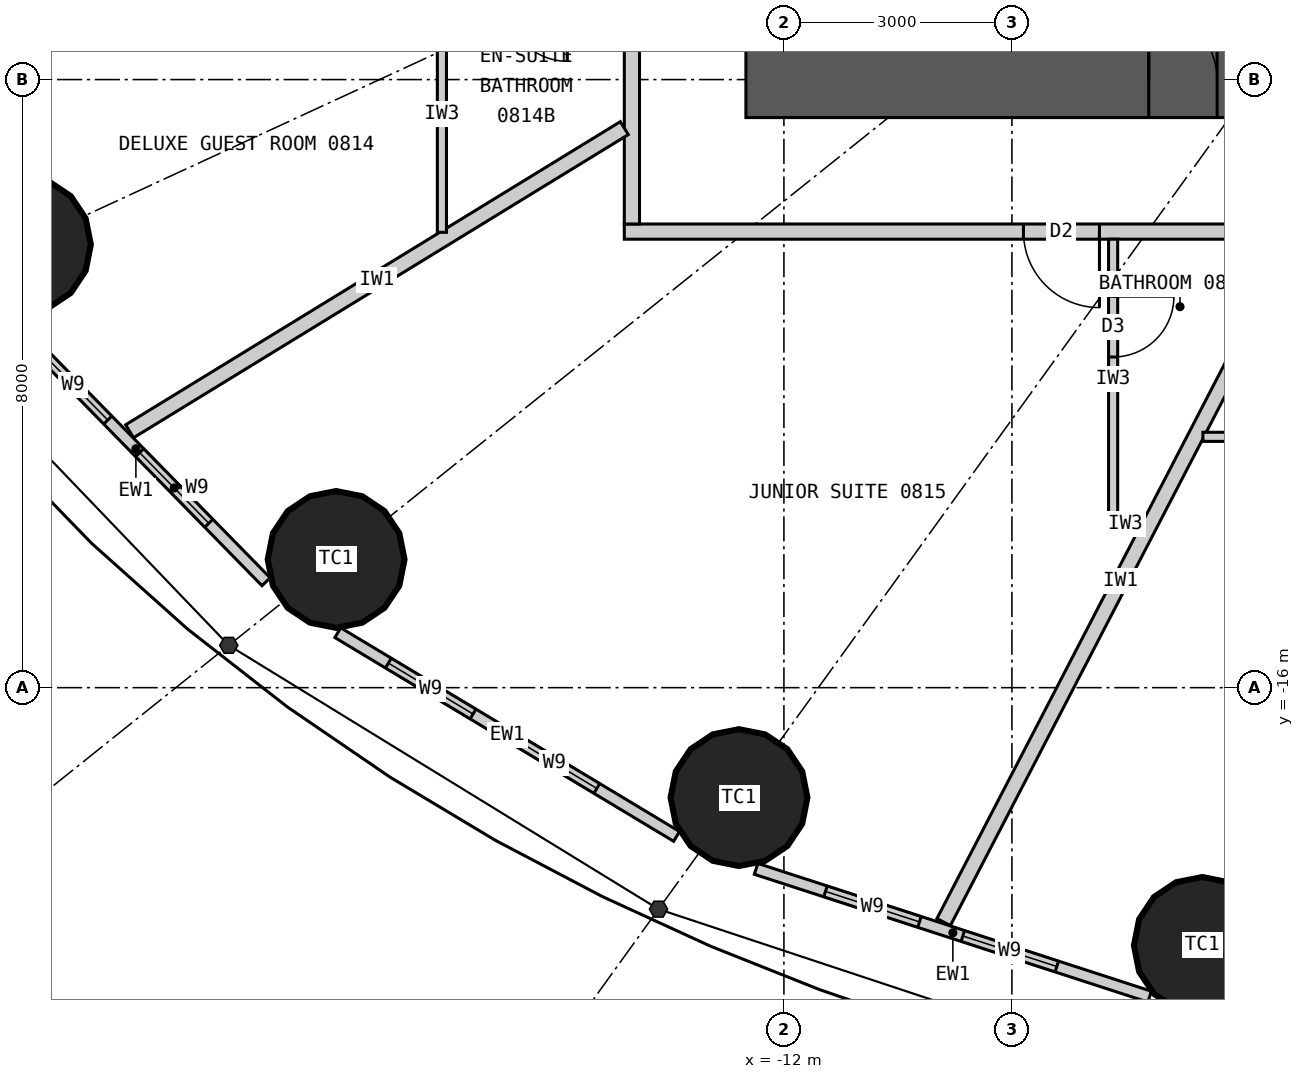
"""IFC4 building model, lengths in metres.
Left out: names, types, materials, properties, quantities, classifications, styles, units other than length and angle.
Written with IfcOpenShell. Run it as: python <this file> out.ifc"""

import sys

from ifc_helpers import new_model, si_unit, direction, frame, frame_2d, origin, origin_2d, place, context, subcontext, project, spatial, rectangle, circle, extrude, element, fill, save


model = new_model("IFC4")
c1 = context("Model", 3, precision=1e-05, world=origin(), true_north=direction((0.0, 1.0)))
c2 = subcontext(c1, "Body", "Model", "MODEL_VIEW")
j1 = project(units=[si_unit("LENGTHUNIT", "METRE"), si_unit("PLANEANGLEUNIT", "RADIAN")], contexts=[c1])
p1 = place(None, origin())
s1 = spatial("IfcSite", under=j1, at=p1, CompositionType="ELEMENT")
p2 = place(p1, origin())
s2 = spatial("IfcBuilding", under=s1, at=p2, CompositionType="ELEMENT")
p3 = place(p2, frame((0.0, 0.0, 39.3)))
s3 = spatial("IfcBuildingStorey", under=s2, at=p3, CompositionType="ELEMENT", Elevation=39.3)
for number, where, z_axis, x_axis in (
    (1, (-22.019, -10.17, 0.0), (0.0, 0.0, 1.0), (1.0, 0.0, 0.0)),
    (2, (-17.892, -14.313, 0.0), (0.0, 0.0, 1.0), (1.0, 0.0, 0.0)),
    (3, (-12.591, -17.447, 0.0), (0.0, 0.0, 1.0), (1.0, 0.0, 0.0)),
    (4, (-6.495, -19.391, 0.0), (0.0, 0.0, 1.0), (1.0, 0.0, 0.0)),
):
    element("IfcColumn", number, at=place(p3, frame(where, z_axis=z_axis, x_axis=x_axis)), inside=s3, PredefinedType="COLUMN", context=c2, shape_type="SweptSolid", body=[
        extrude(circle(Radius=0.9, at=origin_2d()), origin(), (0.0, 0.0, 1.0), 3.3),
    ])
p4 = place(p3, frame((12.5, -8.0, 0.0), z_axis=(0.0, 0.0, 1.0), x_axis=(-1.0, 0.0, 0.0)))
e5 = element("IfcWall", 5, at=p4, inside=s3, PredefinedType="SHEAR", context=c2, shape_type="SweptSolid", body=[
    extrude(rectangle(XDim=25.0, YDim=1.0, at=frame_2d((12.5, 0.0))), origin(), (0.0, 0.0, 1.0), 3.3),
])
p5 = place(p4, frame((11.2, 0.0, 0.0)))
e6 = element("IfcOpeningElement", 6, at=p5, cuts=e5, PredefinedType="OPENING", context=c2, shape_type="SweptSolid", body=[
    extrude(rectangle(XDim=1.2, YDim=2.2, at=frame_2d((0.6, 1.1))), frame((0.0, 0.51, 0.0), z_axis=(0.0, -1.0, 0.0), x_axis=(1.0, 0.0, 0.0)), (0.0, 0.0, 1.0), 1.02),
])
p6 = place(p4, frame((18.8, 0.0, 0.0)))
e7 = element("IfcOpeningElement", 7, at=p6, cuts=e5, PredefinedType="OPENING", context=c2, shape_type="SweptSolid", body=[
    extrude(rectangle(XDim=0.9, YDim=2.2, at=frame_2d((0.45, 1.1))), frame((0.0, 0.51, 0.0), z_axis=(0.0, -1.0, 0.0), x_axis=(1.0, 0.0, 0.0)), (0.0, 0.0, 1.0), 1.02),
])
p7 = place(p3, frame((-22.239, -11.108, 0.0), z_axis=(0.0, 0.0, 1.0), x_axis=(0.699612594083, -0.714522370679, 0.0)))
e8 = element("IfcWall", 8, at=p7, inside=s3, PredefinedType="ELEMENTEDWALL", context=c2, shape_type="SweptSolid", body=[
    extrude(rectangle(XDim=4.896, YDim=0.15, at=frame_2d((2.448, 0.0))), origin(), (0.0, 0.0, 1.0), 3.12),
])
p8 = place(p7, frame((0.619, 0.0, 0.9)))
e9 = element("IfcOpeningElement", 9, at=p8, cuts=e8, PredefinedType="OPENING", context=c2, shape_type="SweptSolid", body=[
    extrude(rectangle(XDim=1.3, YDim=1.9, at=frame_2d((0.65, 0.95))), frame((0.0, 0.085, 0.0), z_axis=(0.0, -1.0, 0.0), x_axis=(1.0, 0.0, 0.0)), (0.0, 0.0, 1.0), 0.17),
])
p9 = place(p7, frame((2.519, 0.0, 0.9)))
e10 = element("IfcOpeningElement", 10, at=p9, cuts=e8, PredefinedType="OPENING", context=c2, shape_type="SweptSolid", body=[
    extrude(rectangle(XDim=1.3, YDim=1.9, at=frame_2d((0.65, 0.95))), frame((0.0, 0.085, 0.0), z_axis=(0.0, -1.0, 0.0), x_axis=(1.0, 0.0, 0.0)), (0.0, 0.0, 1.0), 0.17),
])
p10 = place(p3, frame((-17.869, -15.277, 0.0), z_axis=(0.0, 0.0, 1.0), x_axis=(0.856958191554, -0.515385931054, 0.0)))
e11 = element("IfcWall", 11, at=p10, inside=s3, PredefinedType="ELEMENTEDWALL", context=c2, shape_type="SweptSolid", body=[
    extrude(rectangle(XDim=5.201, YDim=0.15, at=frame_2d((2.601, 0.0))), origin(), (0.0, 0.0, 1.0), 3.12),
])
p11 = place(p10, frame((0.776, 0.0, 0.9)))
e12 = element("IfcOpeningElement", 12, at=p11, cuts=e11, PredefinedType="OPENING", context=c2, shape_type="SweptSolid", body=[
    extrude(rectangle(XDim=1.3, YDim=1.9, at=frame_2d((0.65, 0.95))), frame((0.0, 0.085, 0.0), z_axis=(0.0, -1.0, 0.0), x_axis=(1.0, 0.0, 0.0)), (0.0, 0.0, 1.0), 0.17),
])
p12 = place(p10, frame((2.676, 0.0, 0.9)))
e13 = element("IfcOpeningElement", 13, at=p12, cuts=e11, PredefinedType="OPENING", context=c2, shape_type="SweptSolid", body=[
    extrude(rectangle(XDim=1.3, YDim=1.9, at=frame_2d((0.65, 0.95))), frame((0.0, 0.085, 0.0), z_axis=(0.0, -1.0, 0.0), x_axis=(1.0, 0.0, 0.0)), (0.0, 0.0, 1.0), 0.17),
])
p13 = place(p3, frame((-12.366, -18.384, 0.0), z_axis=(0.0, 0.0, 1.0), x_axis=(0.951138486029, -0.308764603532, 0.0)))
e14 = element("IfcWall", 14, at=p13, inside=s3, PredefinedType="ELEMENTEDWALL", context=c2, shape_type="SweptSolid", body=[
    extrude(rectangle(XDim=5.444, YDim=0.15, at=frame_2d((2.722, 0.0))), origin(), (0.0, 0.0, 1.0), 3.12),
])
p14 = place(p13, frame((0.96, 0.0, 0.9)))
e15 = element("IfcOpeningElement", 15, at=p14, cuts=e14, PredefinedType="OPENING", context=c2, shape_type="SweptSolid", body=[
    extrude(rectangle(XDim=1.3, YDim=1.9, at=frame_2d((0.65, 0.95))), frame((0.0, 0.085, 0.0), z_axis=(0.0, -1.0, 0.0), x_axis=(1.0, 0.0, 0.0)), (0.0, 0.0, 1.0), 0.17),
])
p15 = place(p13, frame((2.86, 0.0, 0.9)))
e16 = element("IfcOpeningElement", 16, at=p15, cuts=e14, PredefinedType="OPENING", context=c2, shape_type="SweptSolid", body=[
    extrude(rectangle(XDim=1.3, YDim=1.9, at=frame_2d((0.65, 0.95))), frame((0.0, 0.085, 0.0), z_axis=(0.0, -1.0, 0.0), x_axis=(1.0, 0.0, 0.0)), (0.0, 0.0, 1.0), 0.17),
])
p16 = place(p3, frame((14.1, -10.0, 0.0), z_axis=(0.0, 0.0, 1.0), x_axis=(-1.0, 0.0, 0.0)))
e17 = element("IfcWall", 17, at=p16, inside=s3, PredefinedType="PARTITIONING", context=c2, shape_type="SweptSolid", body=[
    extrude(rectangle(XDim=28.2, YDim=0.2, at=frame_2d((14.1, 0.0))), origin(), (0.0, 0.0, 1.0), 3.12),
])
p17 = place(p16, frame((21.948, 0.0, 0.0)))
e18 = element("IfcOpeningElement", 18, at=p17, cuts=e17, PredefinedType="OPENING", context=c2, shape_type="SweptSolid", body=[
    extrude(rectangle(XDim=1.0, YDim=2.2, at=frame_2d((0.5, 1.1))), frame((0.0, 0.11, 0.0), z_axis=(0.0, -1.0, 0.0), x_axis=(1.0, 0.0, 0.0)), (0.0, 0.0, 1.0), 0.22),
])
p18 = place(p16, frame((15.684, 0.0, 0.0)))
e19 = element("IfcOpeningElement", 19, at=p18, cuts=e17, PredefinedType="OPENING", context=c2, shape_type="SweptSolid", body=[
    extrude(rectangle(XDim=1.0, YDim=2.2, at=frame_2d((0.5, 1.1))), frame((0.0, 0.11, 0.0), z_axis=(0.0, -1.0, 0.0), x_axis=(1.0, 0.0, 0.0)), (0.0, 0.0, 1.0), 0.22),
])
p19 = place(p16, frame((8.875, 0.0, 0.0)))
e20 = element("IfcOpeningElement", 20, at=p19, cuts=e17, PredefinedType="OPENING", context=c2, shape_type="SweptSolid", body=[
    extrude(rectangle(XDim=1.0, YDim=2.2, at=frame_2d((0.5, 1.1))), frame((0.0, 0.11, 0.0), z_axis=(0.0, -1.0, 0.0), x_axis=(1.0, 0.0, 0.0)), (0.0, 0.0, 1.0), 0.22),
])
p20 = place(p3, frame((-14.0, 9.9, 0.0), z_axis=(0.0, 0.0, 1.0), x_axis=(0.0, -1.0, 0.0)))
e21 = element("IfcWall", 21, at=p20, inside=s3, PredefinedType="PARTITIONING", context=c2, shape_type="SweptSolid", body=[
    extrude(rectangle(XDim=19.8, YDim=0.2, at=frame_2d((9.9, 0.0))), origin(), (0.0, 0.0, 1.0), 3.12),
])
p21 = place(p20, frame((0.103, 0.0, 0.0)))
e22 = element("IfcOpeningElement", 22, at=p21, cuts=e21, PredefinedType="OPENING", context=c2, shape_type="SweptSolid", body=[
    extrude(rectangle(XDim=1.0, YDim=2.2, at=frame_2d((0.5, 1.1))), frame((0.0, 0.11, 0.0), z_axis=(0.0, -1.0, 0.0), x_axis=(1.0, 0.0, 0.0)), (0.0, 0.0, 1.0), 0.22),
])
p22 = place(p20, frame((5.252, 0.0, 0.0)))
e23 = element("IfcOpeningElement", 23, at=p22, cuts=e21, PredefinedType="OPENING", context=c2, shape_type="SweptSolid", body=[
    extrude(rectangle(XDim=1.0, YDim=2.0, at=frame_2d((0.5, 1.0))), frame((0.0, 0.11, 0.0), z_axis=(0.0, -1.0, 0.0), x_axis=(1.0, 0.0, 0.0)), (0.0, 0.0, 1.0), 0.22),
])
p23 = place(p20, frame((10.117, 0.0, 0.0)))
e24 = element("IfcOpeningElement", 24, at=p23, cuts=e21, PredefinedType="OPENING", context=c2, shape_type="SweptSolid", body=[
    extrude(rectangle(XDim=1.0, YDim=2.2, at=frame_2d((0.5, 1.1))), frame((0.0, 0.11, 0.0), z_axis=(0.0, -1.0, 0.0), x_axis=(1.0, 0.0, 0.0)), (0.0, 0.0, 1.0), 0.22),
])
p24 = place(p20, frame((13.247, 0.0, 0.0)))
e25 = element("IfcOpeningElement", 25, at=p24, cuts=e21, PredefinedType="OPENING", context=c2, shape_type="SweptSolid", body=[
    extrude(rectangle(XDim=1.0, YDim=2.0, at=frame_2d((0.5, 1.0))), frame((0.0, 0.11, 0.0), z_axis=(0.0, -1.0, 0.0), x_axis=(1.0, 0.0, 0.0)), (0.0, 0.0, 1.0), 0.22),
])
p25 = place(p20, frame((15.679, 0.0, 0.0)))
e26 = element("IfcOpeningElement", 26, at=p25, cuts=e21, PredefinedType="OPENING", context=c2, shape_type="SweptSolid", body=[
    extrude(rectangle(XDim=1.0, YDim=2.2, at=frame_2d((0.5, 1.1))), frame((0.0, 0.11, 0.0), z_axis=(0.0, -1.0, 0.0), x_axis=(1.0, 0.0, 0.0)), (0.0, 0.0, 1.0), 0.22),
])
p26 = place(p3, frame((-14.1, -4.663, 0.0), z_axis=(0.0, 0.0, 1.0), x_axis=(-0.949432655039, -0.31397075269, 0.0)))
e27 = element("IfcWall", 27, at=p26, inside=s3, PredefinedType="PARTITIONING", context=c2, shape_type="SweptSolid", body=[
    extrude(rectangle(XDim=10.486, YDim=0.2, at=frame_2d((5.243, 0.0))), origin(), (0.0, 0.0, 1.0), 3.12),
])
p27 = place(p3, frame((-14.1, -8.639, 0.0), z_axis=(0.0, 0.0, 1.0), x_axis=(-0.852672493023, -0.522445805459, 0.0)))
e28 = element("IfcWall", 28, at=p27, inside=s3, PredefinedType="PARTITIONING", context=c2, shape_type="SweptSolid", body=[
    extrude(rectangle(XDim=7.633, YDim=0.2, at=frame_2d((3.817, 0.0))), origin(), (0.0, 0.0, 1.0), 3.12),
])
p28 = place(p3, frame((-5.239, -10.1, 0.0), z_axis=(0.0, 0.0, 1.0), x_axis=(-0.460422783389, -0.887699758103, 0.0)))
e29 = element("IfcWall", 29, at=p28, inside=s3, PredefinedType="PARTITIONING", context=c2, shape_type="SweptSolid", body=[
    extrude(rectangle(XDim=10.12, YDim=0.2, at=frame_2d((5.06, 0.0))), origin(), (0.0, 0.0, 1.0), 3.12),
])
p29 = place(p3, frame((-16.5, -10.01, 0.0), z_axis=(0.0, 0.0, 1.0), x_axis=(0.0, 1.0, 0.0)))
e30 = element("IfcWall", 30, at=p29, inside=s3, PredefinedType="PARTITIONING", context=c2, shape_type="SweptSolid", body=[
    extrude(rectangle(XDim=3.111, YDim=0.12, at=frame_2d((1.555, 0.0))), origin(), (0.0, 0.0, 1.0), 3.12),
])
p30 = place(p3, frame((-7.284, -13.85, 0.0), z_axis=(0.0, 0.0, 1.0), x_axis=(-1.0, 0.0, 0.0)))
e31 = element("IfcWall", 31, at=p30, inside=s3, PredefinedType="PARTITIONING", context=c2, shape_type="SweptSolid", body=[
    extrude(rectangle(XDim=0.445, YDim=0.12, at=frame_2d((0.222, 0.0))), origin(), (0.0, 0.0, 1.0), 3.12),
])
p31 = place(p3, frame((-7.669, -10.1, 0.0), z_axis=(0.0, 0.0, 1.0), x_axis=(0.0, -1.0, 0.0)))
e32 = element("IfcWall", 32, at=p31, inside=s3, PredefinedType="PARTITIONING", context=c2, shape_type="SweptSolid", body=[
    extrude(rectangle(XDim=3.69, YDim=0.12, at=frame_2d((1.845, 0.0))), origin(), (0.0, 0.0, 1.0), 3.12),
])
p32 = place(p31, frame((0.75, 0.0, 0.0)))
e33 = element("IfcOpeningElement", 33, at=p32, cuts=e32, PredefinedType="OPENING", context=c2, shape_type="SweptSolid", body=[
    extrude(rectangle(XDim=0.8, YDim=2.1, at=frame_2d((0.4, 1.05))), frame((0.0, 0.07, 0.0), z_axis=(0.0, -1.0, 0.0), x_axis=(1.0, 0.0, 0.0)), (0.0, 0.0, 1.0), 0.14),
])
p33 = place(p3, frame((-6.487, -12.7, 0.0), z_axis=(0.0, 0.0, 1.0), x_axis=(1.0, 0.0, 0.0)))
e34 = element("IfcWall", 34, at=p33, inside=s3, PredefinedType="PARTITIONING", context=c2, shape_type="SweptSolid", body=[
    extrude(rectangle(XDim=3.688, YDim=0.12, at=frame_2d((1.844, 0.0))), origin(), (0.0, 0.0, 1.0), 3.12),
])
p34 = place(p8, origin())
e35 = element("IfcWindow", 35, at=p34, inside=s3, PartitioningType="SINGLE_PANEL", PredefinedType="WINDOW", context=c2, shape_type="SweptSolid", body=[
    extrude(rectangle(XDim=1.3, YDim=1.9, at=frame_2d((0.65, 0.95))), frame((0.0, 0.03, 0.0), z_axis=(0.0, -1.0, 0.0), x_axis=(1.0, 0.0, 0.0)), (0.0, 0.0, 1.0), 0.06),
])
fill(e9, e35)
p35 = place(p9, origin())
e36 = element("IfcWindow", 36, at=p35, inside=s3, PartitioningType="SINGLE_PANEL", PredefinedType="WINDOW", context=c2, shape_type="SweptSolid", body=[
    extrude(rectangle(XDim=1.3, YDim=1.9, at=frame_2d((0.65, 0.95))), frame((0.0, 0.03, 0.0), z_axis=(0.0, -1.0, 0.0), x_axis=(1.0, 0.0, 0.0)), (0.0, 0.0, 1.0), 0.06),
])
fill(e10, e36)
p36 = place(p11, origin())
e37 = element("IfcWindow", 37, at=p36, inside=s3, PartitioningType="SINGLE_PANEL", PredefinedType="WINDOW", context=c2, shape_type="SweptSolid", body=[
    extrude(rectangle(XDim=1.3, YDim=1.9, at=frame_2d((0.65, 0.95))), frame((0.0, 0.03, 0.0), z_axis=(0.0, -1.0, 0.0), x_axis=(1.0, 0.0, 0.0)), (0.0, 0.0, 1.0), 0.06),
])
fill(e12, e37)
p37 = place(p12, origin())
e38 = element("IfcWindow", 38, at=p37, inside=s3, PartitioningType="SINGLE_PANEL", PredefinedType="WINDOW", context=c2, shape_type="SweptSolid", body=[
    extrude(rectangle(XDim=1.3, YDim=1.9, at=frame_2d((0.65, 0.95))), frame((0.0, 0.03, 0.0), z_axis=(0.0, -1.0, 0.0), x_axis=(1.0, 0.0, 0.0)), (0.0, 0.0, 1.0), 0.06),
])
fill(e13, e38)
p38 = place(p14, origin())
e39 = element("IfcWindow", 39, at=p38, inside=s3, PartitioningType="SINGLE_PANEL", PredefinedType="WINDOW", context=c2, shape_type="SweptSolid", body=[
    extrude(rectangle(XDim=1.3, YDim=1.9, at=frame_2d((0.65, 0.95))), frame((0.0, 0.03, 0.0), z_axis=(0.0, -1.0, 0.0), x_axis=(1.0, 0.0, 0.0)), (0.0, 0.0, 1.0), 0.06),
])
fill(e15, e39)
p39 = place(p15, origin())
e40 = element("IfcWindow", 40, at=p39, inside=s3, PartitioningType="SINGLE_PANEL", PredefinedType="WINDOW", context=c2, shape_type="SweptSolid", body=[
    extrude(rectangle(XDim=1.3, YDim=1.9, at=frame_2d((0.65, 0.95))), frame((0.0, 0.03, 0.0), z_axis=(0.0, -1.0, 0.0), x_axis=(1.0, 0.0, 0.0)), (0.0, 0.0, 1.0), 0.06),
])
fill(e16, e40)
p40 = place(p32, origin())
e41 = element("IfcDoor", 41, at=p40, inside=s3, OperationType="SINGLE_SWING_LEFT", PredefinedType="DOOR", context=c2, shape_type="SweptSolid", body=[
    extrude(rectangle(XDim=0.8, YDim=2.1, at=frame_2d((0.4, 1.05))), frame((0.0, 0.025, 0.0), z_axis=(0.0, -1.0, 0.0), x_axis=(1.0, 0.0, 0.0)), (0.0, 0.0, 1.0), 0.05),
])
fill(e33, e41)
p41 = place(p17, origin())
e42 = element("IfcDoor", 42, at=p41, inside=s3, OperationType="SINGLE_SWING_LEFT", PredefinedType="DOOR", context=c2, shape_type="SweptSolid", body=[
    extrude(rectangle(XDim=1.0, YDim=2.2, at=frame_2d((0.5, 1.1))), frame((0.0, 0.025, 0.0), z_axis=(0.0, -1.0, 0.0), x_axis=(1.0, 0.0, 0.0)), (0.0, 0.0, 1.0), 0.05),
])
fill(e18, e42)
p42 = place(p6, origin())
e43 = element("IfcDoor", 43, at=p42, inside=s3, OperationType="SINGLE_SWING_RIGHT", PredefinedType="DOOR", context=c2, shape_type="SweptSolid", body=[
    extrude(rectangle(XDim=0.9, YDim=2.2, at=frame_2d((0.45, 1.1))), frame((0.0, 0.025, 0.0), z_axis=(0.0, -1.0, 0.0), x_axis=(1.0, 0.0, 0.0)), (0.0, 0.0, 1.0), 0.05),
])
fill(e7, e43)
save(model, sys.argv[1])
